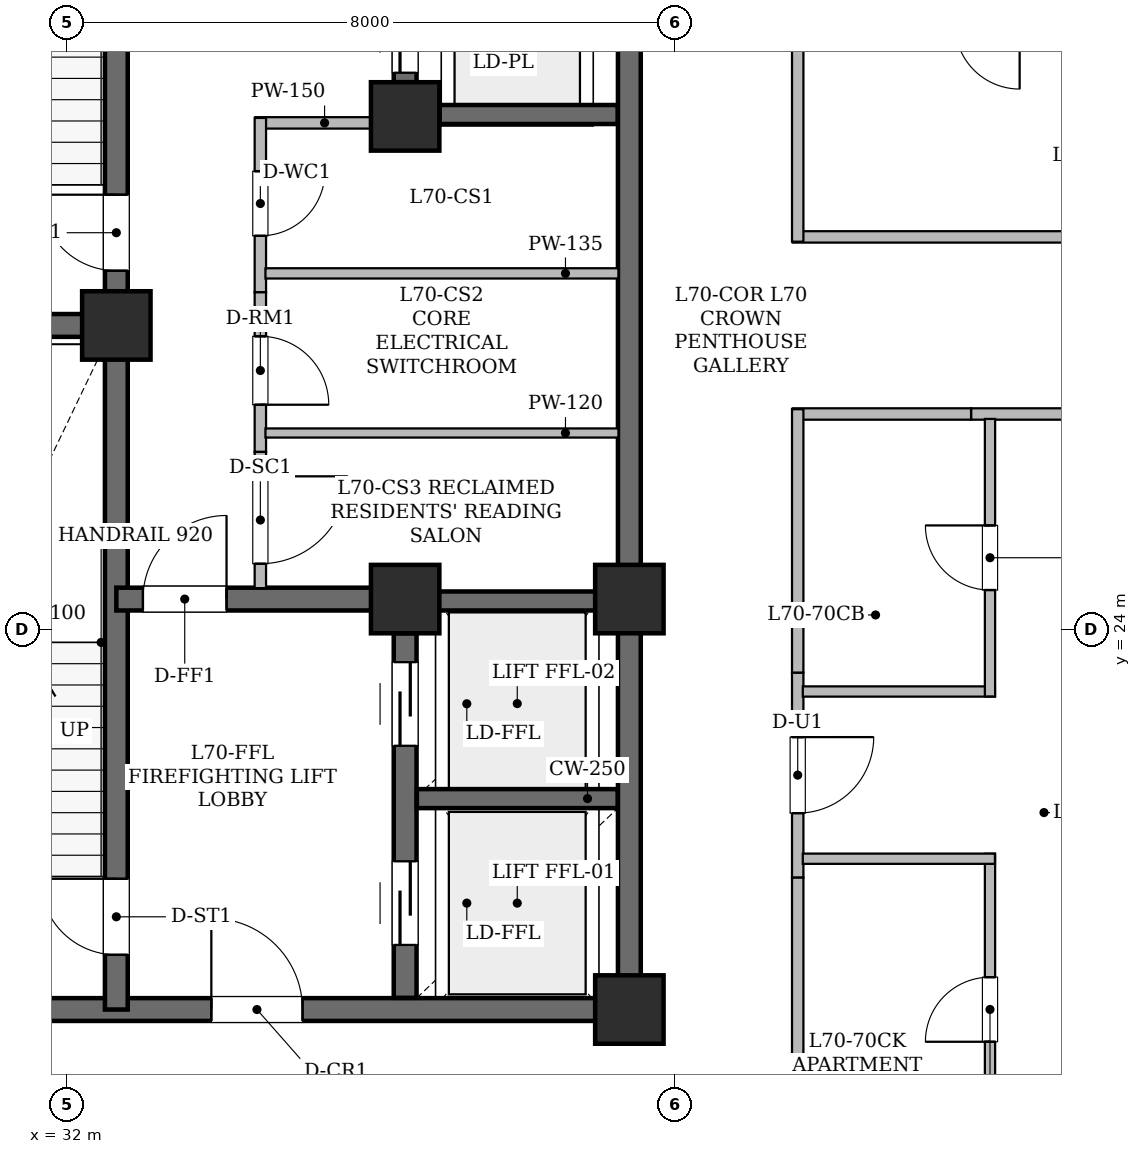
"""IFC4 building model, lengths in metres.
Left out: names, types, materials, properties, quantities, classifications, styles, units other than length and angle.
Written with IfcOpenShell. Run it as: python <this file> out.ifc"""

import sys

from ifc_helpers import new_model, si_unit, direction, frame, frame_2d, origin, origin_2d, place, context, subcontext, project, spatial, rectangle, hollow_rectangle, extrude, element, fill, save


model = new_model("IFC4")
c1 = context("Model", 3, precision=1e-05, world=origin(), true_north=direction((0.0, 1.0)))
c2 = subcontext(c1, "Body", "Model", "MODEL_VIEW")
j1 = project(units=[si_unit("LENGTHUNIT", "METRE"), si_unit("PLANEANGLEUNIT", "RADIAN")], contexts=[c1])
p1 = place(None, origin())
s1 = spatial("IfcSite", under=j1, at=p1, CompositionType="ELEMENT")
p2 = place(p1, origin())
s2 = spatial("IfcBuilding", under=s1, at=p2, CompositionType="ELEMENT")
p3 = place(p2, frame((0.0, 0.0, 273.65)))
s3 = spatial("IfcBuildingStorey", under=s2, at=p3, CompositionType="ELEMENT", Elevation=273.65)
for number, where, z_axis, x_axis in (
    (1, (32.65, 28.0, 0.0), (0.0, 0.0, 1.0), (1.0, 0.0, 0.0)),
    (2, (39.4, 19.0, 0.0), (0.0, 0.0, 1.0), (1.0, 0.0, 0.0)),
    (3, (36.45, 24.4, 0.0), (0.0, 0.0, 1.0), (1.0, 0.0, 0.0)),
    (4, (39.4, 24.4, 0.0), (0.0, 0.0, 1.0), (1.0, 0.0, 0.0)),
    (5, (36.45, 30.75, 0.0), (0.0, 0.0, 1.0), (1.0, 0.0, 0.0)),
):
    element("IfcColumn", number, at=place(p3, frame(where, z_axis=z_axis, x_axis=x_axis)), inside=s3, PredefinedType="COLUMN", context=c2, shape_type="SweptSolid", body=[
        extrude(hollow_rectangle(XDim=0.9, YDim=0.9, WallThickness=0.045, at=origin_2d()), origin(), (0.0, 0.0, 1.0), 4.2),
    ])
p4 = place(p3, frame((29.0, 19.0, 0.0), z_axis=(0.0, 0.0, 1.0), x_axis=(1.0, 0.0, 0.0)))
e6 = element("IfcWall", 6, at=p4, inside=s3, PredefinedType="SHEAR", context=c2, shape_type="SweptSolid", body=[
    extrude(rectangle(XDim=10.4, YDim=0.3, at=frame_2d((5.2, 0.0))), origin(), (0.0, 0.0, 1.0), 3.78),
])
p5 = place(p4, frame((4.9, 0.0, 0.0)))
e7 = element("IfcOpeningElement", 7, at=p5, cuts=e6, PredefinedType="OPENING", context=c2, shape_type="SweptSolid", body=[
    extrude(rectangle(XDim=1.2, YDim=2.15, at=frame_2d((0.6, 1.075))), frame((0.0, 0.16, 0.0), z_axis=(0.0, -1.0, 0.0), x_axis=(1.0, 0.0, 0.0)), (0.0, 0.0, 1.0), 0.32),
])
p6 = place(p3, frame((39.4, 19.0, 0.0), z_axis=(0.0, 0.0, 1.0), x_axis=(0.0, 1.0, 0.0)))
e8 = element("IfcWall", 8, at=p6, inside=s3, PredefinedType="SHEAR", context=c2, shape_type="SweptSolid", body=[
    extrude(rectangle(XDim=5.4, YDim=0.3, at=frame_2d((2.7, 0.0))), origin(), (0.0, 0.0, 1.0), 3.78),
])
p7 = place(p3, frame((39.4, 24.4, 0.0), z_axis=(0.0, 0.0, 1.0), x_axis=(0.0, 1.0, 0.0)))
e9 = element("IfcWall", 9, at=p7, inside=s3, PredefinedType="SHEAR", context=c2, shape_type="SweptSolid", body=[
    extrude(rectangle(XDim=12.6, YDim=0.3, at=frame_2d((6.3, 0.0))), origin(), (0.0, 0.0, 1.0), 3.78),
])
p8 = place(p3, frame((32.65, 19.0, 0.0), z_axis=(0.0, 0.0, 1.0), x_axis=(0.0, 1.0, 0.0)))
e10 = element("IfcWall", 10, at=p8, inside=s3, PredefinedType="SHEAR", context=c2, shape_type="SweptSolid", body=[
    extrude(rectangle(XDim=9.0, YDim=0.3, at=frame_2d((4.5, 0.0))), origin(), (0.0, 0.0, 1.0), 3.78),
])
p9 = place(p8, frame((0.72, 0.0, 0.0)))
e11 = element("IfcOpeningElement", 11, at=p9, cuts=e10, PredefinedType="OPENING", context=c2, shape_type="SweptSolid", body=[
    extrude(rectangle(XDim=1.0, YDim=2.15, at=frame_2d((0.5, 1.075))), frame((0.0, 0.16, 0.0), z_axis=(0.0, -1.0, 0.0), x_axis=(1.0, 0.0, 0.0)), (0.0, 0.0, 1.0), 0.32),
])
p10 = place(p3, frame((32.65, 28.0, 0.0), z_axis=(0.0, 0.0, 1.0), x_axis=(0.0, 1.0, 0.0)))
e12 = element("IfcWall", 12, at=p10, inside=s3, PredefinedType="SHEAR", context=c2, shape_type="SweptSolid", body=[
    extrude(rectangle(XDim=9.0, YDim=0.3, at=frame_2d((4.5, 0.0))), origin(), (0.0, 0.0, 1.0), 3.78),
])
p11 = place(p10, frame((0.72, 0.0, 0.0)))
e13 = element("IfcOpeningElement", 13, at=p11, cuts=e12, PredefinedType="OPENING", context=c2, shape_type="SweptSolid", body=[
    extrude(rectangle(XDim=1.0, YDim=2.15, at=frame_2d((0.5, 1.075))), frame((0.0, 0.16, 0.0), z_axis=(0.0, -1.0, 0.0), x_axis=(1.0, 0.0, 0.0)), (0.0, 0.0, 1.0), 0.32),
])
p12 = place(p3, frame((29.0, 28.0, 0.0), z_axis=(0.0, 0.0, 1.0), x_axis=(1.0, 0.0, 0.0)))
e14 = element("IfcWall", 14, at=p12, inside=s3, PredefinedType="SHEAR", context=c2, shape_type="SweptSolid", body=[
    extrude(rectangle(XDim=3.65, YDim=0.3, at=frame_2d((1.825, 0.0))), origin(), (0.0, 0.0, 1.0), 3.78),
])
p13 = place(p3, frame((32.65, 24.4, 0.0), z_axis=(0.0, 0.0, 1.0), x_axis=(1.0, 0.0, 0.0)))
e15 = element("IfcWall", 15, at=p13, inside=s3, PredefinedType="SHEAR", context=c2, shape_type="SweptSolid", body=[
    extrude(rectangle(XDim=3.8, YDim=0.3, at=frame_2d((1.9, 0.0))), origin(), (0.0, 0.0, 1.0), 3.78),
])
p14 = place(p13, frame((0.35, 0.0, 0.0)))
e16 = element("IfcOpeningElement", 16, at=p14, cuts=e15, PredefinedType="OPENING", context=c2, shape_type="SweptSolid", body=[
    extrude(rectangle(XDim=1.1, YDim=2.15, at=frame_2d((0.55, 1.075))), frame((0.0, 0.16, 0.0), z_axis=(0.0, -1.0, 0.0), x_axis=(1.0, 0.0, 0.0)), (0.0, 0.0, 1.0), 0.32),
])
p15 = place(p3, frame((36.45, 19.154, 0.0), z_axis=(0.0, 0.0, 1.0), x_axis=(0.0, 1.0, 0.0)))
e17 = element("IfcWall", 17, at=p15, inside=s3, PredefinedType="SHEAR", context=c2, shape_type="SweptSolid", body=[
    extrude(rectangle(XDim=4.796, YDim=0.3, at=frame_2d((2.398, 0.0))), origin(), (0.0, 0.0, 1.0), 3.78),
])
p16 = place(p15, frame((0.696, 0.0, 0.0)))
e18 = element("IfcOpeningElement", 18, at=p16, cuts=e17, PredefinedType="OPENING", context=c2, shape_type="SweptSolid", body=[
    extrude(rectangle(XDim=1.1, YDim=2.15, at=frame_2d((0.55, 1.075))), frame((0.0, 0.16, 0.0), z_axis=(0.0, -1.0, 0.0), x_axis=(1.0, 0.0, 0.0)), (0.0, 0.0, 1.0), 0.32),
])
p17 = place(p15, frame((3.316, 0.0, 0.0)))
e19 = element("IfcOpeningElement", 19, at=p17, cuts=e17, PredefinedType="OPENING", context=c2, shape_type="SweptSolid", body=[
    extrude(rectangle(XDim=1.1, YDim=2.15, at=frame_2d((0.55, 1.075))), frame((0.0, 0.16, 0.0), z_axis=(0.0, -1.0, 0.0), x_axis=(1.0, 0.0, 0.0)), (0.0, 0.0, 1.0), 0.32),
])
p18 = place(p3, frame((36.45, 31.2, 0.0), z_axis=(0.0, 0.0, 1.0), x_axis=(0.0, 1.0, 0.0)))
e20 = element("IfcWall", 20, at=p18, inside=s3, PredefinedType="SHEAR", context=c2, shape_type="SweptSolid", body=[
    extrude(rectangle(XDim=5.646, YDim=0.3, at=frame_2d((2.823, 0.0))), origin(), (0.0, 0.0, 1.0), 3.78),
])
p19 = place(p18, frame((0.125, 0.0, 0.0)))
e21 = element("IfcOpeningElement", 21, at=p19, cuts=e20, PredefinedType="OPENING", context=c2, shape_type="SweptSolid", body=[
    extrude(rectangle(XDim=1.05, YDim=2.15, at=frame_2d((0.525, 1.075))), frame((0.0, 0.16, 0.0), z_axis=(0.0, -1.0, 0.0), x_axis=(1.0, 0.0, 0.0)), (0.0, 0.0, 1.0), 0.32),
])
p20 = place(p18, frame((2.175, 0.0, 0.0)))
e22 = element("IfcOpeningElement", 22, at=p20, cuts=e20, PredefinedType="OPENING", context=c2, shape_type="SweptSolid", body=[
    extrude(rectangle(XDim=1.05, YDim=2.15, at=frame_2d((0.525, 1.075))), frame((0.0, 0.16, 0.0), z_axis=(0.0, -1.0, 0.0), x_axis=(1.0, 0.0, 0.0)), (0.0, 0.0, 1.0), 0.32),
])
p21 = place(p18, frame((4.195, 0.0, 0.0)))
e23 = element("IfcOpeningElement", 23, at=p21, cuts=e20, PredefinedType="OPENING", context=c2, shape_type="SweptSolid", body=[
    extrude(rectangle(XDim=1.05, YDim=2.15, at=frame_2d((0.525, 1.075))), frame((0.0, 0.16, 0.0), z_axis=(0.0, -1.0, 0.0), x_axis=(1.0, 0.0, 0.0)), (0.0, 0.0, 1.0), 0.32),
])
for number, where, z_axis, x_axis in (
    (24, (36.604, 21.775, 0.0), (0.0, 0.0, 1.0), (1.0, 0.0, 0.0)),
    (25, (36.604, 24.375, 0.0), (0.0, 0.0, 1.0), (1.0, 0.0, 0.0)),
):
    element("IfcWall", number, at=place(p3, frame(where, z_axis=z_axis, x_axis=x_axis)), inside=s3, PredefinedType="SHEAR", context=c2, shape_type="SweptSolid", body=[
        extrude(rectangle(XDim=2.642, YDim=0.25, at=frame_2d((1.321, 0.0))), origin(), (0.0, 0.0, 1.0), 3.78),
    ])
p22 = place(p3, frame((36.904, 30.775, 0.0), z_axis=(0.0, 0.0, 1.0), x_axis=(1.0, 0.0, 0.0)))
e26 = element("IfcWall", 26, at=p22, inside=s3, PredefinedType="SHEAR", context=c2, shape_type="SweptSolid", body=[
    extrude(rectangle(XDim=2.342, YDim=0.25, at=frame_2d((1.171, 0.0))), origin(), (0.0, 0.0, 1.0), 3.78),
])
p23 = place(p3, frame((36.3, 30.665, 0.0), z_axis=(0.0, 0.0, 1.0), x_axis=(-1.0, 0.0, 0.0)))
e27 = element("IfcWall", 27, at=p23, inside=s3, PredefinedType="STANDARD", context=c2, shape_type="SweptSolid", body=[
    extrude(rectangle(XDim=1.82, YDim=0.15, at=frame_2d((0.91, 0.0))), origin(), (0.0, 0.0, 1.0), 3.78),
])
p24 = place(p3, frame((34.545, 30.73, 0.0), z_axis=(0.0, 0.0, 1.0), x_axis=(0.0, -1.0, 0.0)))
e28 = element("IfcWall", 28, at=p24, inside=s3, PredefinedType="STANDARD", context=c2, shape_type="SweptSolid", body=[
    extrude(rectangle(XDim=2.294, YDim=0.15, at=frame_2d((1.147, 0.0))), origin(), (0.0, 0.0, 1.0), 3.78),
])
p25 = place(p24, frame((0.701, 0.0, 0.0)))
e29 = element("IfcOpeningElement", 29, at=p25, cuts=e28, PredefinedType="OPENING", context=c2, shape_type="SweptSolid", body=[
    extrude(rectangle(XDim=0.85, YDim=2.1, at=frame_2d((0.425, 1.05))), frame((0.0, 0.085, 0.0), z_axis=(0.0, -1.0, 0.0), x_axis=(1.0, 0.0, 0.0)), (0.0, 0.0, 1.0), 0.17),
])
p26 = place(p3, frame((34.545, 28.436, 0.0), z_axis=(0.0, 0.0, 1.0), x_axis=(0.0, -1.0, 0.0)))
e30 = element("IfcWall", 30, at=p26, inside=s3, PredefinedType="STANDARD", context=c2, shape_type="SweptSolid", body=[
    extrude(rectangle(XDim=2.1, YDim=0.15, at=frame_2d((1.05, 0.0))), origin(), (0.0, 0.0, 1.0), 3.78),
])
p27 = place(p26, frame((0.579, 0.0, 0.0)))
e31 = element("IfcOpeningElement", 31, at=p27, cuts=e30, PredefinedType="OPENING", context=c2, shape_type="SweptSolid", body=[
    extrude(rectangle(XDim=0.9, YDim=2.1, at=frame_2d((0.45, 1.05))), frame((0.0, 0.085, 0.0), z_axis=(0.0, -1.0, 0.0), x_axis=(1.0, 0.0, 0.0)), (0.0, 0.0, 1.0), 0.17),
])
p28 = place(p3, frame((34.545, 26.336, 0.0), z_axis=(0.0, 0.0, 1.0), x_axis=(0.0, -1.0, 0.0)))
e32 = element("IfcWall", 32, at=p28, inside=s3, PredefinedType="STANDARD", context=c2, shape_type="SweptSolid", body=[
    extrude(rectangle(XDim=1.792, YDim=0.15, at=frame_2d((0.896, 0.0))), origin(), (0.0, 0.0, 1.0), 3.78),
])
p29 = place(p28, frame((0.321, 0.0, 0.0)))
e33 = element("IfcOpeningElement", 33, at=p29, cuts=e32, PredefinedType="OPENING", context=c2, shape_type="SweptSolid", body=[
    extrude(rectangle(XDim=1.15, YDim=2.2, at=frame_2d((0.575, 1.1))), frame((0.0, 0.085, 0.0), z_axis=(0.0, -1.0, 0.0), x_axis=(1.0, 0.0, 0.0)), (0.0, 0.0, 1.0), 0.17),
])
p30 = place(p3, frame((39.256, 28.685, 0.0), z_axis=(0.0, 0.0, 1.0), x_axis=(-1.0, 0.0, 0.0)))
e34 = element("IfcWall", 34, at=p30, inside=s3, PredefinedType="PARTITIONING", context=c2, shape_type="SweptSolid", body=[
    extrude(rectangle(XDim=4.644, YDim=0.135, at=frame_2d((2.322, 0.0))), origin(), (0.0, 0.0, 1.0), 3.78),
])
p31 = place(p3, frame((39.256, 26.585, 0.0), z_axis=(0.0, 0.0, 1.0), x_axis=(-1.0, 0.0, 0.0)))
e35 = element("IfcWall", 35, at=p31, inside=s3, PredefinedType="PARTITIONING", context=c2, shape_type="SweptSolid", body=[
    extrude(rectangle(XDim=4.644, YDim=0.12, at=frame_2d((2.322, 0.0))), origin(), (0.0, 0.0, 1.0), 3.78),
])
p32 = place(p3, frame((45.974, 26.835, 0.0), z_axis=(0.0, 0.0, 1.0), x_axis=(-1.0, 0.0, 0.0)))
e36 = element("IfcWall", 36, at=p32, inside=s3, PredefinedType="STANDARD", context=c2, shape_type="SweptSolid", body=[
    extrude(rectangle(XDim=2.078, YDim=0.15, at=frame_2d((1.039, 0.0))), origin(), (0.0, 0.0, 1.0), 3.78),
])
p33 = place(p3, frame((41.615, 23.433, 0.0), z_axis=(0.0, 0.0, 1.0), x_axis=(0.0, -1.0, 0.0)))
e37 = element("IfcWall", 37, at=p33, inside=s3, PredefinedType="STANDARD", context=c2, shape_type="SweptSolid", body=[
    extrude(rectangle(XDim=2.698, YDim=0.15, at=frame_2d((1.349, 0.0))), origin(), (0.0, 0.0, 1.0), 2.22),
])
p34 = place(p33, frame((0.849, 0.0, 0.0)))
e38 = element("IfcOpeningElement", 38, at=p34, cuts=e37, PredefinedType="OPENING", context=c2, shape_type="SweptSolid", body=[
    extrude(rectangle(XDim=1.0, YDim=2.15, at=frame_2d((0.5, 1.075))), frame((0.0, 0.085, 0.0), z_axis=(0.0, -1.0, 0.0), x_axis=(1.0, 0.0, 0.0)), (0.0, 0.0, 1.0), 0.17),
])
p35 = place(p3, frame((43.896, 26.835, 0.0), z_axis=(0.0, 0.0, 1.0), x_axis=(-1.0, 0.0, 0.0)))
e39 = element("IfcWall", 39, at=p35, inside=s3, PredefinedType="STANDARD", context=c2, shape_type="SweptSolid", body=[
    extrude(rectangle(XDim=2.346, YDim=0.15, at=frame_2d((1.173, 0.0))), origin(), (0.0, 0.0, 1.0), 3.78),
])
p36 = place(p3, frame((41.615, 26.898, 0.0), z_axis=(0.0, 0.0, 1.0), x_axis=(0.0, -1.0, 0.0)))
e40 = element("IfcWall", 40, at=p36, inside=s3, PredefinedType="STANDARD", context=c2, shape_type="SweptSolid", body=[
    extrude(rectangle(XDim=3.465, YDim=0.15, at=frame_2d((1.732, 0.0))), origin(), (0.0, 0.0, 1.0), 2.22),
])
p37 = place(p3, frame((41.615, 20.735, 0.0), z_axis=(0.0, 0.0, 1.0), x_axis=(0.0, -1.0, 0.0)))
e41 = element("IfcWall", 41, at=p37, inside=s3, PredefinedType="STANDARD", context=c2, shape_type="SweptSolid", body=[
    extrude(rectangle(XDim=3.135, YDim=0.15, at=frame_2d((1.567, 0.0))), origin(), (0.0, 0.0, 1.0), 2.22),
])
p38 = place(p3, frame((41.55, 29.165, 0.0), z_axis=(0.0, 0.0, 1.0), x_axis=(1.0, 0.0, 0.0)))
e42 = element("IfcWall", 42, at=p38, inside=s3, PredefinedType="STANDARD", context=c2, shape_type="SweptSolid", body=[
    extrude(rectangle(XDim=4.675, YDim=0.15, at=frame_2d((2.337, 0.0))), origin(), (0.0, 0.0, 1.0), 3.78),
])
p39 = place(p3, frame((41.615, 31.711, 0.0), z_axis=(0.0, 0.0, 1.0), x_axis=(0.0, -1.0, 0.0)))
e43 = element("IfcWall", 43, at=p39, inside=s3, PredefinedType="STANDARD", context=c2, shape_type="SweptSolid", body=[
    extrude(rectangle(XDim=2.609, YDim=0.15, at=frame_2d((1.304, 0.0))), origin(), (0.0, 0.0, 1.0), 3.78),
])
p40 = place(p3, frame((41.682, 23.184, 0.0), z_axis=(0.0, 0.0, 1.0), x_axis=(1.0, 0.0, 0.0)))
e44 = element("IfcWall", 44, at=p40, inside=s3, PredefinedType="PARTITIONING", context=c2, shape_type="SweptSolid", body=[
    extrude(rectangle(XDim=2.528, YDim=0.135, at=frame_2d((1.264, 0.0))), origin(), (0.0, 0.0, 1.0), 2.22),
])
p41 = place(p3, frame((44.145, 23.119, 0.0), z_axis=(0.0, 0.0, 1.0), x_axis=(0.0, 1.0, 0.0)))
e45 = element("IfcWall", 45, at=p41, inside=s3, PredefinedType="PARTITIONING", context=c2, shape_type="SweptSolid", body=[
    extrude(rectangle(XDim=3.651, YDim=0.135, at=frame_2d((1.826, 0.0))), origin(), (0.0, 0.0, 1.0), 2.22),
])
p42 = place(p41, frame((1.4, 0.0, 0.0)))
e46 = element("IfcOpeningElement", 46, at=p42, cuts=e45, PredefinedType="OPENING", context=c2, shape_type="SweptSolid", body=[
    extrude(rectangle(XDim=0.85, YDim=2.1, at=frame_2d((0.425, 1.05))), frame((0.0, 0.077, 0.0), z_axis=(0.0, -1.0, 0.0), x_axis=(1.0, 0.0, 0.0)), (0.0, 0.0, 1.0), 0.155),
])
p43 = place(p3, frame((44.145, 16.954, 0.0), z_axis=(0.0, 0.0, 1.0), x_axis=(0.0, 1.0, 0.0)))
e47 = element("IfcWall", 47, at=p43, inside=s3, PredefinedType="PARTITIONING", context=c2, shape_type="SweptSolid", body=[
    extrude(rectangle(XDim=4.095, YDim=0.135, at=frame_2d((2.047, 0.0))), origin(), (0.0, 0.0, 1.0), 2.22),
])
p44 = place(p43, frame((1.622, 0.0, 0.0)))
e48 = element("IfcOpeningElement", 48, at=p44, cuts=e47, PredefinedType="OPENING", context=c2, shape_type="SweptSolid", body=[
    extrude(rectangle(XDim=0.85, YDim=2.1, at=frame_2d((0.425, 1.05))), frame((0.0, 0.077, 0.0), z_axis=(0.0, -1.0, 0.0), x_axis=(1.0, 0.0, 0.0)), (0.0, 0.0, 1.0), 0.155),
])
p45 = place(p3, frame((44.21, 20.984, 0.0), z_axis=(0.0, 0.0, 1.0), x_axis=(-1.0, 0.0, 0.0)))
e49 = element("IfcWall", 49, at=p45, inside=s3, PredefinedType="PARTITIONING", context=c2, shape_type="SweptSolid", body=[
    extrude(rectangle(XDim=2.528, YDim=0.135, at=frame_2d((1.264, 0.0))), origin(), (0.0, 0.0, 1.0), 3.78),
])
p46 = place(p9, origin())
e50 = element("IfcDoor", 50, at=p46, inside=s3, OperationType="SINGLE_SWING_RIGHT", PredefinedType="DOOR", context=c2, shape_type="SweptSolid", body=[
    extrude(rectangle(XDim=1.0, YDim=2.15, at=frame_2d((0.5, 1.075))), frame((0.0, 0.025, 0.0), z_axis=(0.0, -1.0, 0.0), x_axis=(1.0, 0.0, 0.0)), (0.0, 0.0, 1.0), 0.05),
])
fill(e11, e50)
p47 = place(p11, origin())
e51 = element("IfcDoor", 51, at=p47, inside=s3, OperationType="SINGLE_SWING_RIGHT", PredefinedType="DOOR", context=c2, shape_type="SweptSolid", body=[
    extrude(rectangle(XDim=1.0, YDim=2.15, at=frame_2d((0.5, 1.075))), frame((0.0, 0.025, 0.0), z_axis=(0.0, -1.0, 0.0), x_axis=(1.0, 0.0, 0.0)), (0.0, 0.0, 1.0), 0.05),
])
fill(e13, e51)
p48 = place(p14, origin())
e52 = element("IfcDoor", 52, at=p48, inside=s3, OperationType="SINGLE_SWING_RIGHT", PredefinedType="DOOR", context=c2, shape_type="SweptSolid", body=[
    extrude(rectangle(XDim=1.1, YDim=2.15, at=frame_2d((0.55, 1.075))), frame((0.0, 0.025, 0.0), z_axis=(0.0, -1.0, 0.0), x_axis=(1.0, 0.0, 0.0)), (0.0, 0.0, 1.0), 0.05),
])
fill(e16, e52)
p49 = place(p5, origin())
e53 = element("IfcDoor", 53, at=p49, inside=s3, OperationType="SINGLE_SWING_LEFT", PredefinedType="DOOR", context=c2, shape_type="SweptSolid", body=[
    extrude(rectangle(XDim=1.2, YDim=2.15, at=frame_2d((0.6, 1.075))), frame((0.0, 0.025, 0.0), z_axis=(0.0, -1.0, 0.0), x_axis=(1.0, 0.0, 0.0)), (0.0, 0.0, 1.0), 0.05),
])
fill(e7, e53)
p50 = place(p16, origin())
e54 = element("IfcDoor", 54, at=p50, inside=s3, OperationType="SLIDING_TO_LEFT", PredefinedType="DOOR", context=c2, shape_type="SweptSolid", body=[
    extrude(rectangle(XDim=1.1, YDim=2.15, at=frame_2d((0.55, 1.075))), frame((0.0, 0.025, 0.0), z_axis=(0.0, -1.0, 0.0), x_axis=(1.0, 0.0, 0.0)), (0.0, 0.0, 1.0), 0.05),
])
fill(e18, e54)
p51 = place(p17, origin())
e55 = element("IfcDoor", 55, at=p51, inside=s3, OperationType="SLIDING_TO_LEFT", PredefinedType="DOOR", context=c2, shape_type="SweptSolid", body=[
    extrude(rectangle(XDim=1.1, YDim=2.15, at=frame_2d((0.55, 1.075))), frame((0.0, 0.025, 0.0), z_axis=(0.0, -1.0, 0.0), x_axis=(1.0, 0.0, 0.0)), (0.0, 0.0, 1.0), 0.05),
])
fill(e19, e55)
p52 = place(p19, origin())
e56 = element("IfcDoor", 56, at=p52, inside=s3, OperationType="SLIDING_TO_LEFT", PredefinedType="DOOR", context=c2, shape_type="SweptSolid", body=[
    extrude(rectangle(XDim=1.05, YDim=2.15, at=frame_2d((0.525, 1.075))), frame((0.0, 0.025, 0.0), z_axis=(0.0, -1.0, 0.0), x_axis=(1.0, 0.0, 0.0)), (0.0, 0.0, 1.0), 0.05),
])
fill(e21, e56)
p53 = place(p25, origin())
e57 = element("IfcDoor", 57, at=p53, inside=s3, OperationType="SINGLE_SWING_LEFT", PredefinedType="DOOR", context=c2, shape_type="SweptSolid", body=[
    extrude(rectangle(XDim=0.85, YDim=2.1, at=frame_2d((0.425, 1.05))), frame((0.0, 0.025, 0.0), z_axis=(0.0, -1.0, 0.0), x_axis=(1.0, 0.0, 0.0)), (0.0, 0.0, 1.0), 0.05),
])
fill(e29, e57)
p54 = place(p27, origin())
e58 = element("IfcDoor", 58, at=p54, inside=s3, OperationType="SINGLE_SWING_RIGHT", PredefinedType="DOOR", context=c2, shape_type="SweptSolid", body=[
    extrude(rectangle(XDim=0.9, YDim=2.1, at=frame_2d((0.45, 1.05))), frame((0.0, 0.025, 0.0), z_axis=(0.0, -1.0, 0.0), x_axis=(1.0, 0.0, 0.0)), (0.0, 0.0, 1.0), 0.05),
])
fill(e31, e58)
p55 = place(p29, origin())
e59 = element("IfcDoor", 59, at=p55, inside=s3, OperationType="SINGLE_SWING_LEFT", PredefinedType="DOOR", context=c2, shape_type="SweptSolid", body=[
    extrude(rectangle(XDim=1.15, YDim=2.2, at=frame_2d((0.575, 1.1))), frame((0.0, 0.025, 0.0), z_axis=(0.0, -1.0, 0.0), x_axis=(1.0, 0.0, 0.0)), (0.0, 0.0, 1.0), 0.05),
])
fill(e33, e59)
p56 = place(p34, origin())
e60 = element("IfcDoor", 60, at=p56, inside=s3, OperationType="SINGLE_SWING_LEFT", PredefinedType="DOOR", context=c2, shape_type="SweptSolid", body=[
    extrude(rectangle(XDim=1.0, YDim=2.15, at=frame_2d((0.5, 1.075))), frame((0.0, 0.025, 0.0), z_axis=(0.0, -1.0, 0.0), x_axis=(1.0, 0.0, 0.0)), (0.0, 0.0, 1.0), 0.05),
])
fill(e38, e60)
p57 = place(p42, origin())
e61 = element("IfcDoor", 61, at=p57, inside=s3, OperationType="SINGLE_SWING_RIGHT", PredefinedType="DOOR", context=c2, shape_type="SweptSolid", body=[
    extrude(rectangle(XDim=0.85, YDim=2.1, at=frame_2d((0.425, 1.05))), frame((0.0, 0.025, 0.0), z_axis=(0.0, -1.0, 0.0), x_axis=(1.0, 0.0, 0.0)), (0.0, 0.0, 1.0), 0.05),
])
fill(e46, e61)
p58 = place(p44, origin())
e62 = element("IfcDoor", 62, at=p58, inside=s3, OperationType="SINGLE_SWING_LEFT", PredefinedType="DOOR", context=c2, shape_type="SweptSolid", body=[
    extrude(rectangle(XDim=0.85, YDim=2.1, at=frame_2d((0.425, 1.05))), frame((0.0, 0.025, 0.0), z_axis=(0.0, -1.0, 0.0), x_axis=(1.0, 0.0, 0.0)), (0.0, 0.0, 1.0), 0.05),
])
fill(e48, e62)
save(model, sys.argv[1])
